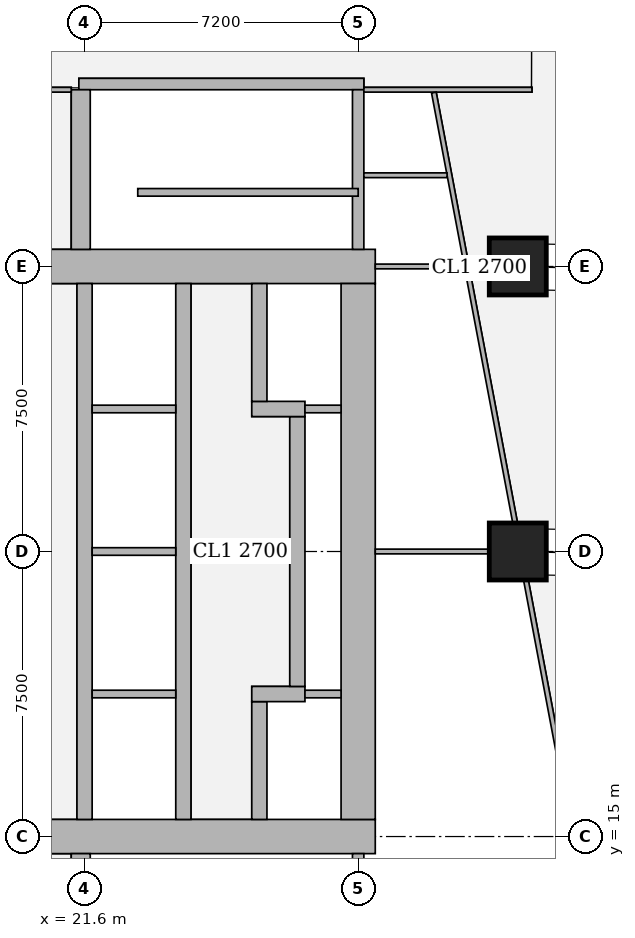
"""IFC4 building model, lengths in metres.
Left out: names, types, materials, properties, quantities, classifications, styles, units other than length and angle.
Written with IfcOpenShell. Run it as: python <this file> out.ifc"""

import sys

from ifc_helpers import new_model, si_unit, direction, frame, frame_2d, origin, origin_2d, place, context, subcontext, project, spatial, rectangle, extrude, element, fill, save


model = new_model("IFC4")
c1 = context("Model", 3, precision=1e-05, world=origin(), true_north=direction((0.0, 1.0)))
c2 = subcontext(c1, "Body", "Model", "MODEL_VIEW")
j1 = project(units=[si_unit("LENGTHUNIT", "METRE"), si_unit("PLANEANGLEUNIT", "RADIAN")], contexts=[c1])
p1 = place(None, origin())
s1 = spatial("IfcSite", under=j1, at=p1, CompositionType="ELEMENT")
p2 = place(p1, origin())
s2 = spatial("IfcBuilding", under=s1, at=p2, CompositionType="ELEMENT")
p3 = place(p2, frame((0.0, 0.0, 180.8)))
s3 = spatial("IfcBuildingStorey", under=s2, at=p3, CompositionType="ELEMENT", Elevation=180.8)
for number, where, z_axis, x_axis in (
    (1, (33.0, 22.5, 0.0), (0.0, 0.0, 1.0), (1.0, 0.0, 0.0)),
    (2, (33.0, 30.0, 0.0), (0.0, 0.0, 1.0), (1.0, 0.0, 0.0)),
):
    element("IfcColumn", number, at=place(p3, frame(where, z_axis=z_axis, x_axis=x_axis)), inside=s3, PredefinedType="COLUMN", context=c2, shape_type="SweptSolid", body=[
        extrude(rectangle(XDim=1.5, YDim=1.5, at=origin_2d()), origin(), (0.0, 0.0, 1.0), 3.75),
    ])
p4 = place(p3, frame((13.95, 15.0, 0.0), z_axis=(0.0, 0.0, 1.0), x_axis=(1.0, 0.0, 0.0)))
e3 = element("IfcWall", 3, at=p4, inside=s3, PredefinedType="SHEAR", context=c2, shape_type="SweptSolid", body=[
    extrude(rectangle(XDim=15.3, YDim=0.9, at=frame_2d((7.65, 0.0))), origin(), (0.0, 0.0, 1.0), 3.75),
])
p5 = place(p4, frame((4.45, 0.0, 0.0)))
e4 = element("IfcOpeningElement", 4, at=p5, cuts=e3, PredefinedType="OPENING", context=c2, shape_type="SweptSolid", body=[
    extrude(rectangle(XDim=1.8, YDim=2.1, at=frame_2d((0.9, 1.05))), frame((0.0, 0.46, 0.0), z_axis=(0.0, -1.0, 0.0), x_axis=(1.0, 0.0, 0.0)), (0.0, 0.0, 1.0), 0.92),
])
p6 = place(p4, frame((10.7, 0.0, 0.0)))
e5 = element("IfcOpeningElement", 5, at=p6, cuts=e3, PredefinedType="OPENING", context=c2, shape_type="SweptSolid", body=[
    extrude(rectangle(XDim=1.1, YDim=2.1, at=frame_2d((0.55, 1.05))), frame((0.0, 0.46, 0.0), z_axis=(0.0, -1.0, 0.0), x_axis=(1.0, 0.0, 0.0)), (0.0, 0.0, 1.0), 0.92),
])
p7 = place(p3, frame((13.95, 30.0, 0.0), z_axis=(0.0, 0.0, 1.0), x_axis=(1.0, 0.0, 0.0)))
e6 = element("IfcWall", 6, at=p7, inside=s3, PredefinedType="SHEAR", context=c2, shape_type="SweptSolid", body=[
    extrude(rectangle(XDim=15.3, YDim=0.9, at=frame_2d((7.65, 0.0))), origin(), (0.0, 0.0, 1.0), 3.75),
])
p8 = place(p7, frame((4.45, 0.0, 0.0)))
e7 = element("IfcOpeningElement", 7, at=p8, cuts=e6, PredefinedType="OPENING", context=c2, shape_type="SweptSolid", body=[
    extrude(rectangle(XDim=1.8, YDim=2.1, at=frame_2d((0.9, 1.05))), frame((0.0, 0.46, 0.0), z_axis=(0.0, -1.0, 0.0), x_axis=(1.0, 0.0, 0.0)), (0.0, 0.0, 1.0), 0.92),
])
p9 = place(p7, frame((10.7, 0.0, 0.0)))
e8 = element("IfcOpeningElement", 8, at=p9, cuts=e6, PredefinedType="OPENING", context=c2, shape_type="SweptSolid", body=[
    extrude(rectangle(XDim=1.1, YDim=2.1, at=frame_2d((0.55, 1.05))), frame((0.0, 0.46, 0.0), z_axis=(0.0, -1.0, 0.0), x_axis=(1.0, 0.0, 0.0)), (0.0, 0.0, 1.0), 0.92),
])
p10 = place(p3, frame((28.8, 15.45, 0.0), z_axis=(0.0, 0.0, 1.0), x_axis=(0.0, 1.0, 0.0)))
e9 = element("IfcWall", 9, at=p10, inside=s3, PredefinedType="SHEAR", context=c2, shape_type="SweptSolid", body=[
    extrude(rectangle(XDim=14.1, YDim=0.9, at=frame_2d((7.05, 0.0))), origin(), (0.0, 0.0, 1.0), 3.75),
])
p11 = place(p3, frame((21.6, 15.45, 0.0), z_axis=(0.0, 0.0, 1.0), x_axis=(0.0, 1.0, 0.0)))
e10 = element("IfcWall", 10, at=p11, inside=s3, PredefinedType="SHEAR", context=c2, shape_type="SweptSolid", body=[
    extrude(rectangle(XDim=14.1, YDim=0.4, at=frame_2d((7.05, 0.0))), origin(), (0.0, 0.0, 1.0), 3.75),
])
p12 = place(p11, frame((0.875, 0.0, 0.0)))
e11 = element("IfcOpeningElement", 11, at=p12, cuts=e10, PredefinedType="OPENING", context=c2, shape_type="SweptSolid", body=[
    extrude(rectangle(XDim=1.1, YDim=2.1, at=frame_2d((0.55, 1.05))), frame((0.0, 0.21, 0.0), z_axis=(0.0, -1.0, 0.0), x_axis=(1.0, 0.0, 0.0)), (0.0, 0.0, 1.0), 0.42),
])
p13 = place(p11, frame((4.625, 0.0, 0.0)))
e12 = element("IfcOpeningElement", 12, at=p13, cuts=e10, PredefinedType="OPENING", context=c2, shape_type="SweptSolid", body=[
    extrude(rectangle(XDim=1.1, YDim=2.1, at=frame_2d((0.55, 1.05))), frame((0.0, 0.21, 0.0), z_axis=(0.0, -1.0, 0.0), x_axis=(1.0, 0.0, 0.0)), (0.0, 0.0, 1.0), 0.42),
])
p14 = place(p11, frame((8.375, 0.0, 0.0)))
e13 = element("IfcOpeningElement", 13, at=p14, cuts=e10, PredefinedType="OPENING", context=c2, shape_type="SweptSolid", body=[
    extrude(rectangle(XDim=1.1, YDim=2.1, at=frame_2d((0.55, 1.05))), frame((0.0, 0.21, 0.0), z_axis=(0.0, -1.0, 0.0), x_axis=(1.0, 0.0, 0.0)), (0.0, 0.0, 1.0), 0.42),
])
p15 = place(p11, frame((12.125, 0.0, 0.0)))
e14 = element("IfcOpeningElement", 14, at=p15, cuts=e10, PredefinedType="OPENING", context=c2, shape_type="SweptSolid", body=[
    extrude(rectangle(XDim=1.1, YDim=2.1, at=frame_2d((0.55, 1.05))), frame((0.0, 0.21, 0.0), z_axis=(0.0, -1.0, 0.0), x_axis=(1.0, 0.0, 0.0)), (0.0, 0.0, 1.0), 0.42),
])
p16 = place(p3, frame((24.2, 15.45, 0.0), z_axis=(0.0, 0.0, 1.0), x_axis=(0.0, 1.0, 0.0)))
e15 = element("IfcWall", 15, at=p16, inside=s3, PredefinedType="SHEAR", context=c2, shape_type="SweptSolid", body=[
    extrude(rectangle(XDim=14.1, YDim=0.4, at=frame_2d((7.05, 0.0))), origin(), (0.0, 0.0, 1.0), 3.75),
])
p17 = place(p3, frame((26.2, 15.45, 0.0), z_axis=(0.0, 0.0, 1.0), x_axis=(0.0, 1.0, 0.0)))
e16 = element("IfcWall", 16, at=p17, inside=s3, PredefinedType="SHEAR", context=c2, shape_type="SweptSolid", body=[
    extrude(rectangle(XDim=3.1, YDim=0.4, at=frame_2d((1.55, 0.0))), origin(), (0.0, 0.0, 1.0), 3.75),
])
p18 = place(p17, frame((0.825, 0.0, 0.0)))
e17 = element("IfcOpeningElement", 17, at=p18, cuts=e16, PredefinedType="OPENING", context=c2, shape_type="SweptSolid", body=[
    extrude(rectangle(XDim=1.2, YDim=2.1, at=frame_2d((0.6, 1.05))), frame((0.0, 0.21, 0.0), z_axis=(0.0, -1.0, 0.0), x_axis=(1.0, 0.0, 0.0)), (0.0, 0.0, 1.0), 0.42),
])
p19 = place(p3, frame((26.0, 18.75, 0.0), z_axis=(0.0, 0.0, 1.0), x_axis=(1.0, 0.0, 0.0)))
e18 = element("IfcWall", 18, at=p19, inside=s3, PredefinedType="SHEAR", context=c2, shape_type="SweptSolid", body=[
    extrude(rectangle(XDim=1.4, YDim=0.4, at=frame_2d((0.7, 0.0))), origin(), (0.0, 0.0, 1.0), 3.75),
])
p20 = place(p3, frame((27.2, 18.95, 0.0), z_axis=(0.0, 0.0, 1.0), x_axis=(0.0, 1.0, 0.0)))
e19 = element("IfcWall", 19, at=p20, inside=s3, PredefinedType="SHEAR", context=c2, shape_type="SweptSolid", body=[
    extrude(rectangle(XDim=7.1, YDim=0.4, at=frame_2d((3.55, 0.0))), origin(), (0.0, 0.0, 1.0), 3.75),
])
p21 = place(p3, frame((26.0, 26.25, 0.0), z_axis=(0.0, 0.0, 1.0), x_axis=(1.0, 0.0, 0.0)))
e20 = element("IfcWall", 20, at=p21, inside=s3, PredefinedType="SHEAR", context=c2, shape_type="SweptSolid", body=[
    extrude(rectangle(XDim=1.4, YDim=0.4, at=frame_2d((0.7, 0.0))), origin(), (0.0, 0.0, 1.0), 3.75),
])
p22 = place(p3, frame((26.2, 26.45, 0.0), z_axis=(0.0, 0.0, 1.0), x_axis=(0.0, 1.0, 0.0)))
e21 = element("IfcWall", 21, at=p22, inside=s3, PredefinedType="SHEAR", context=c2, shape_type="SweptSolid", body=[
    extrude(rectangle(XDim=3.1, YDim=0.4, at=frame_2d((1.55, 0.0))), origin(), (0.0, 0.0, 1.0), 3.75),
])
p23 = place(p22, frame((1.075, 0.0, 0.0)))
e22 = element("IfcOpeningElement", 22, at=p23, cuts=e21, PredefinedType="OPENING", context=c2, shape_type="SweptSolid", body=[
    extrude(rectangle(XDim=1.2, YDim=2.1, at=frame_2d((0.6, 1.05))), frame((0.0, 0.21, 0.0), z_axis=(0.0, -1.0, 0.0), x_axis=(1.0, 0.0, 0.0)), (0.0, 0.0, 1.0), 0.42),
])
p24 = place(p3, frame((21.5, 10.35, 0.0), z_axis=(0.0, 0.0, 1.0), x_axis=(0.0, 1.0, 0.0)))
e23 = element("IfcWall", 23, at=p24, inside=s3, PredefinedType="SHEAR", context=c2, shape_type="SweptSolid", body=[
    extrude(rectangle(XDim=4.2, YDim=0.5, at=frame_2d((2.1, 0.0))), origin(), (0.0, 0.0, 1.0), 3.75),
])
p25 = place(p3, frame((28.8, 10.35, 0.0), z_axis=(0.0, 0.0, 1.0), x_axis=(0.0, 1.0, 0.0)))
e24 = element("IfcWall", 24, at=p25, inside=s3, PredefinedType="SHEAR", context=c2, shape_type="SweptSolid", body=[
    extrude(rectangle(XDim=4.2, YDim=0.3, at=frame_2d((2.1, 0.0))), origin(), (0.0, 0.0, 1.0), 3.75),
])
p26 = place(p3, frame((21.45, 34.8, 0.0), z_axis=(0.0, 0.0, 1.0), x_axis=(1.0, 0.0, 0.0)))
e25 = element("IfcWall", 25, at=p26, inside=s3, PredefinedType="SHEAR", context=c2, shape_type="SweptSolid", body=[
    extrude(rectangle(XDim=7.5, YDim=0.3, at=frame_2d((3.75, 0.0))), origin(), (0.0, 0.0, 1.0), 3.75),
])
p27 = place(p26, frame((0.5, 0.0, 0.0)))
e26 = element("IfcOpeningElement", 26, at=p27, cuts=e25, PredefinedType="OPENING", context=c2, shape_type="SweptSolid", body=[
    extrude(rectangle(XDim=1.1, YDim=2.1, at=frame_2d((0.55, 1.05))), frame((0.0, 0.16, 0.0), z_axis=(0.0, -1.0, 0.0), x_axis=(1.0, 0.0, 0.0)), (0.0, 0.0, 1.0), 0.32),
])
p28 = place(p3, frame((21.5, 30.45, 0.0), z_axis=(0.0, 0.0, 1.0), x_axis=(0.0, 1.0, 0.0)))
e27 = element("IfcWall", 27, at=p28, inside=s3, PredefinedType="SHEAR", context=c2, shape_type="SweptSolid", body=[
    extrude(rectangle(XDim=4.2, YDim=0.5, at=frame_2d((2.1, 0.0))), origin(), (0.0, 0.0, 1.0), 3.75),
])
p29 = place(p3, frame((28.8, 30.45, 0.0), z_axis=(0.0, 0.0, 1.0), x_axis=(0.0, 1.0, 0.0)))
e28 = element("IfcWall", 28, at=p29, inside=s3, PredefinedType="SHEAR", context=c2, shape_type="SweptSolid", body=[
    extrude(rectangle(XDim=4.2, YDim=0.3, at=frame_2d((2.1, 0.0))), origin(), (0.0, 0.0, 1.0), 3.75),
])
p30 = place(p3, frame((33.623, 43.022, 0.0), z_axis=(0.0, 0.0, 1.0), x_axis=(0.185596841028, -0.98262597798, 0.0)))
e29 = element("IfcWall", 29, at=p30, inside=s3, PredefinedType="SOLIDWALL", context=c2, shape_type="SweptSolid", body=[
    extrude(rectangle(XDim=41.66, YDim=0.15, at=frame_2d((20.83, 0.0))), origin(), (0.0, 0.0, 1.0), 2.5),
])
p31 = place(p30, frame((8.034, 0.0, 0.0)))
e30 = element("IfcOpeningElement", 30, at=p31, cuts=e29, PredefinedType="OPENING", context=c2, shape_type="SweptSolid", body=[
    extrude(rectangle(XDim=1.0, YDim=2.1, at=frame_2d((0.5, 1.05))), frame((0.0, 0.085, 0.0), z_axis=(0.0, -1.0, 0.0), x_axis=(1.0, 0.0, 0.0)), (0.0, 0.0, 1.0), 0.17),
])
p32 = place(p30, frame((12.611, 0.0, 0.0)))
e31 = element("IfcOpeningElement", 31, at=p32, cuts=e29, PredefinedType="OPENING", context=c2, shape_type="SweptSolid", body=[
    extrude(rectangle(XDim=1.0, YDim=2.1, at=frame_2d((0.5, 1.05))), frame((0.0, 0.085, 0.0), z_axis=(0.0, -1.0, 0.0), x_axis=(1.0, 0.0, 0.0)), (0.0, 0.0, 1.0), 0.17),
])
p33 = place(p30, frame((20.242, 0.0, 0.0)))
e32 = element("IfcOpeningElement", 32, at=p33, cuts=e29, PredefinedType="OPENING", context=c2, shape_type="SweptSolid", body=[
    extrude(rectangle(XDim=1.0, YDim=2.1, at=frame_2d((0.5, 1.05))), frame((0.0, 0.085, 0.0), z_axis=(0.0, -1.0, 0.0), x_axis=(1.0, 0.0, 0.0)), (0.0, 0.0, 1.0), 0.17),
])
p34 = place(p30, frame((31.206, 0.0, 0.0)))
e33 = element("IfcOpeningElement", 33, at=p34, cuts=e29, PredefinedType="OPENING", context=c2, shape_type="SweptSolid", body=[
    extrude(rectangle(XDim=1.0, YDim=2.1, at=frame_2d((0.5, 1.05))), frame((0.0, 0.085, 0.0), z_axis=(0.0, -1.0, 0.0), x_axis=(1.0, 0.0, 0.0)), (0.0, 0.0, 1.0), 0.17),
])
p35 = place(p3, frame((10.413, 34.65, 0.0), z_axis=(0.0, 0.0, 1.0), x_axis=(1.0, 0.0, 0.0)))
e34 = element("IfcWall", 34, at=p35, inside=s3, PredefinedType="PARTITIONING", context=c2, shape_type="SweptSolid", body=[
    extrude(rectangle(XDim=10.837, YDim=0.125, at=frame_2d((5.418, 0.0))), origin(), (0.0, 0.0, 1.0), 3.5),
])
p36 = place(p35, frame((7.487, 0.0, 0.0)))
e35 = element("IfcOpeningElement", 35, at=p36, cuts=e34, PredefinedType="OPENING", context=c2, shape_type="SweptSolid", body=[
    extrude(rectangle(XDim=1.8, YDim=2.1, at=frame_2d((0.9, 1.05))), frame((0.0, 0.073, 0.0), z_axis=(0.0, -1.0, 0.0), x_axis=(1.0, 0.0, 0.0)), (0.0, 0.0, 1.0), 0.145),
])
p37 = place(p3, frame((28.95, 34.65, 0.0), z_axis=(0.0, 0.0, 1.0), x_axis=(1.0, 0.0, 0.0)))
e36 = element("IfcWall", 36, at=p37, inside=s3, PredefinedType="PARTITIONING", context=c2, shape_type="SweptSolid", body=[
    extrude(rectangle(XDim=4.423, YDim=0.125, at=frame_2d((2.211, 0.0))), origin(), (0.0, 0.0, 1.0), 3.5),
])
p38 = place(p3, frame((35.354, 10.424, 0.0), z_axis=(0.0, 0.0, 1.0), x_axis=(-0.185612234763, 0.982623070311, 0.0)))
e37 = element("IfcWall", 37, at=p38, inside=s3, PredefinedType="PARTITIONING", context=c2, shape_type="SweptSolid", body=[
    extrude(rectangle(XDim=11.513, YDim=0.125, at=frame_2d((5.756, 0.0))), origin(), (0.0, 0.0, 1.0), 3.5),
])
p39 = place(p38, frame((0.697, 0.0, 0.0)))
e38 = element("IfcOpeningElement", 38, at=p39, cuts=e37, PredefinedType="OPENING", context=c2, shape_type="SweptSolid", body=[
    extrude(rectangle(XDim=1.0, YDim=2.1, at=frame_2d((0.5, 1.05))), frame((0.0, 0.073, 0.0), z_axis=(0.0, -1.0, 0.0), x_axis=(1.0, 0.0, 0.0)), (0.0, 0.0, 1.0), 0.145),
])
p40 = place(p3, frame((32.929, 23.263, 0.0), z_axis=(0.0, 0.0, 1.0), x_axis=(-0.185612234763, 0.982623070311, 0.0)))
e39 = element("IfcWall", 39, at=p40, inside=s3, PredefinedType="PARTITIONING", context=c2, shape_type="SweptSolid", body=[
    extrude(rectangle(XDim=11.513, YDim=0.125, at=frame_2d((5.756, 0.0))), origin(), (0.0, 0.0, 1.0), 3.5),
])
p41 = place(p40, frame((0.15, 0.0, 0.0)))
e40 = element("IfcOpeningElement", 40, at=p41, cuts=e39, PredefinedType="OPENING", context=c2, shape_type="SweptSolid", body=[
    extrude(rectangle(XDim=1.0, YDim=2.1, at=frame_2d((0.5, 1.05))), frame((0.0, 0.073, 0.0), z_axis=(0.0, -1.0, 0.0), x_axis=(1.0, 0.0, 0.0)), (0.0, 0.0, 1.0), 0.145),
])
p42 = place(p40, frame((7.679, 0.0, 0.0)))
e41 = element("IfcOpeningElement", 41, at=p42, cuts=e39, PredefinedType="OPENING", context=c2, shape_type="SweptSolid", body=[
    extrude(rectangle(XDim=1.0, YDim=2.1, at=frame_2d((0.5, 1.05))), frame((0.0, 0.073, 0.0), z_axis=(0.0, -1.0, 0.0), x_axis=(1.0, 0.0, 0.0)), (0.0, 0.0, 1.0), 0.145),
])
p43 = place(p40, frame((10.122, 0.0, 0.0)))
e42 = element("IfcOpeningElement", 42, at=p43, cuts=e39, PredefinedType="OPENING", context=c2, shape_type="SweptSolid", body=[
    extrude(rectangle(XDim=1.0, YDim=2.1, at=frame_2d((0.5, 1.05))), frame((0.0, 0.073, 0.0), z_axis=(0.0, -1.0, 0.0), x_axis=(1.0, 0.0, 0.0)), (0.0, 0.0, 1.0), 0.145),
])
p44 = place(p3, frame((29.25, 22.5, 0.0), z_axis=(0.0, 0.0, 1.0), x_axis=(1.0, 0.0, 0.0)))
e43 = element("IfcWall", 43, at=p44, inside=s3, PredefinedType="PARTITIONING", context=c2, shape_type="SweptSolid", body=[
    extrude(rectangle(XDim=2.999, YDim=0.125, at=frame_2d((1.5, 0.0))), origin(), (0.0, 0.0, 1.0), 3.5),
])
p45 = place(p3, frame((29.25, 30.0, 0.0), z_axis=(0.0, 0.0, 1.0), x_axis=(1.0, 0.0, 0.0)))
e44 = element("IfcWall", 44, at=p45, inside=s3, PredefinedType="PARTITIONING", context=c2, shape_type="SweptSolid", body=[
    extrude(rectangle(XDim=2.342, YDim=0.125, at=frame_2d((1.171, 0.0))), origin(), (0.0, 0.0, 1.0), 3.5),
])
p46 = place(p3, frame((28.95, 32.4, 0.0), z_axis=(0.0, 0.0, 1.0), x_axis=(1.0, 0.0, 0.0)))
e45 = element("IfcWall", 45, at=p46, inside=s3, PredefinedType="PARTITIONING", context=c2, shape_type="SweptSolid", body=[
    extrude(rectangle(XDim=2.189, YDim=0.125, at=frame_2d((1.094, 0.0))), origin(), (0.0, 0.0, 1.0), 3.5),
])
p47 = place(p3, frame((23.0, 31.95, 0.0), z_axis=(0.0, 0.0, 1.0), x_axis=(1.0, 0.0, 0.0)))
e46 = element("IfcWall", 46, at=p47, inside=s3, PredefinedType="SHEAR", context=c2, shape_type="SweptSolid", body=[
    extrude(rectangle(XDim=5.8, YDim=0.2, at=frame_2d((2.9, 0.0))), origin(), (0.0, 0.0, 1.0), 3.75),
])
for number, where, z_axis, x_axis in (
    (47, (21.8, 18.75, 0.0), (0.0, 0.0, 1.0), (1.0, 0.0, 0.0)),
    (48, (21.8, 22.5, 0.0), (0.0, 0.0, 1.0), (1.0, 0.0, 0.0)),
    (49, (21.8, 26.25, 0.0), (0.0, 0.0, 1.0), (1.0, 0.0, 0.0)),
):
    element("IfcWall", number, at=place(p3, frame(where, z_axis=z_axis, x_axis=x_axis)), inside=s3, PredefinedType="SOLIDWALL", context=c2, shape_type="SweptSolid", body=[
        extrude(rectangle(XDim=2.2, YDim=0.2, at=frame_2d((1.1, 0.0))), origin(), (0.0, 0.0, 1.0), 3.5),
    ])
for number, where, z_axis, x_axis in (
    (50, (27.4, 18.75, 0.0), (0.0, 0.0, 1.0), (1.0, 0.0, 0.0)),
    (51, (27.4, 26.25, 0.0), (0.0, 0.0, 1.0), (1.0, 0.0, 0.0)),
):
    element("IfcWall", number, at=place(p3, frame(where, z_axis=z_axis, x_axis=x_axis)), inside=s3, PredefinedType="SOLIDWALL", context=c2, shape_type="SweptSolid", body=[
        extrude(rectangle(XDim=0.95, YDim=0.2, at=frame_2d((0.475, 0.0))), origin(), (0.0, 0.0, 1.0), 3.5),
    ])
p48 = place(p41, origin())
e52 = element("IfcDoor", 52, at=p48, inside=s3, OperationType="SINGLE_SWING_LEFT", PredefinedType="DOOR", context=c2, shape_type="SweptSolid", body=[
    extrude(rectangle(XDim=1.0, YDim=2.1, at=frame_2d((0.5, 1.05))), frame((0.0, 0.025, 0.0), z_axis=(0.0, -1.0, 0.0), x_axis=(1.0, 0.0, 0.0)), (0.0, 0.0, 1.0), 0.05),
])
fill(e40, e52)
p49 = place(p42, origin())
e53 = element("IfcDoor", 53, at=p49, inside=s3, OperationType="SINGLE_SWING_RIGHT", PredefinedType="DOOR", context=c2, shape_type="SweptSolid", body=[
    extrude(rectangle(XDim=1.0, YDim=2.1, at=frame_2d((0.5, 1.05))), frame((0.0, 0.025, 0.0), z_axis=(0.0, -1.0, 0.0), x_axis=(1.0, 0.0, 0.0)), (0.0, 0.0, 1.0), 0.05),
])
fill(e41, e53)
p50 = place(p43, origin())
e54 = element("IfcDoor", 54, at=p50, inside=s3, OperationType="SINGLE_SWING_RIGHT", PredefinedType="DOOR", context=c2, shape_type="SweptSolid", body=[
    extrude(rectangle(XDim=1.0, YDim=2.1, at=frame_2d((0.5, 1.05))), frame((0.0, 0.025, 0.0), z_axis=(0.0, -1.0, 0.0), x_axis=(1.0, 0.0, 0.0)), (0.0, 0.0, 1.0), 0.05),
])
fill(e42, e54)
p51 = place(p6, origin())
e55 = element("IfcDoor", 55, at=p51, inside=s3, OperationType="SINGLE_SWING_RIGHT", PredefinedType="DOOR", context=c2, shape_type="SweptSolid", body=[
    extrude(rectangle(XDim=1.1, YDim=2.1, at=frame_2d((0.55, 1.05))), frame((0.0, 0.025, 0.0), z_axis=(0.0, -1.0, 0.0), x_axis=(1.0, 0.0, 0.0)), (0.0, 0.0, 1.0), 0.05),
])
fill(e5, e55)
p52 = place(p9, origin())
e56 = element("IfcDoor", 56, at=p52, inside=s3, OperationType="SINGLE_SWING_RIGHT", PredefinedType="DOOR", context=c2, shape_type="SweptSolid", body=[
    extrude(rectangle(XDim=1.1, YDim=2.1, at=frame_2d((0.55, 1.05))), frame((0.0, 0.025, 0.0), z_axis=(0.0, -1.0, 0.0), x_axis=(1.0, 0.0, 0.0)), (0.0, 0.0, 1.0), 0.05),
])
fill(e8, e56)
p53 = place(p18, origin())
e57 = element("IfcDoor", 57, at=p53, inside=s3, OperationType="DOUBLE_DOOR_SLIDING", PredefinedType="DOOR", context=c2, shape_type="SweptSolid", body=[
    extrude(rectangle(XDim=1.2, YDim=2.1, at=frame_2d((0.6, 1.05))), frame((0.0, 0.025, 0.0), z_axis=(0.0, -1.0, 0.0), x_axis=(1.0, 0.0, 0.0)), (0.0, 0.0, 1.0), 0.05),
])
fill(e17, e57)
p54 = place(p23, origin())
e58 = element("IfcDoor", 58, at=p54, inside=s3, OperationType="DOUBLE_DOOR_SLIDING", PredefinedType="DOOR", context=c2, shape_type="SweptSolid", body=[
    extrude(rectangle(XDim=1.2, YDim=2.1, at=frame_2d((0.6, 1.05))), frame((0.0, 0.025, 0.0), z_axis=(0.0, -1.0, 0.0), x_axis=(1.0, 0.0, 0.0)), (0.0, 0.0, 1.0), 0.05),
])
fill(e22, e58)
p55 = place(p12, origin())
e59 = element("IfcDoor", 59, at=p55, inside=s3, OperationType="DOUBLE_DOOR_SLIDING", PredefinedType="DOOR", context=c2, shape_type="SweptSolid", body=[
    extrude(rectangle(XDim=1.1, YDim=2.1, at=frame_2d((0.55, 1.05))), frame((0.0, 0.025, 0.0), z_axis=(0.0, -1.0, 0.0), x_axis=(1.0, 0.0, 0.0)), (0.0, 0.0, 1.0), 0.05),
])
fill(e11, e59)
p56 = place(p13, origin())
e60 = element("IfcDoor", 60, at=p56, inside=s3, OperationType="DOUBLE_DOOR_SLIDING", PredefinedType="DOOR", context=c2, shape_type="SweptSolid", body=[
    extrude(rectangle(XDim=1.1, YDim=2.1, at=frame_2d((0.55, 1.05))), frame((0.0, 0.025, 0.0), z_axis=(0.0, -1.0, 0.0), x_axis=(1.0, 0.0, 0.0)), (0.0, 0.0, 1.0), 0.05),
])
fill(e12, e60)
p57 = place(p14, origin())
e61 = element("IfcDoor", 61, at=p57, inside=s3, OperationType="DOUBLE_DOOR_SLIDING", PredefinedType="DOOR", context=c2, shape_type="SweptSolid", body=[
    extrude(rectangle(XDim=1.1, YDim=2.1, at=frame_2d((0.55, 1.05))), frame((0.0, 0.025, 0.0), z_axis=(0.0, -1.0, 0.0), x_axis=(1.0, 0.0, 0.0)), (0.0, 0.0, 1.0), 0.05),
])
fill(e13, e61)
p58 = place(p15, origin())
e62 = element("IfcDoor", 62, at=p58, inside=s3, OperationType="DOUBLE_DOOR_SLIDING", PredefinedType="DOOR", context=c2, shape_type="SweptSolid", body=[
    extrude(rectangle(XDim=1.1, YDim=2.1, at=frame_2d((0.55, 1.05))), frame((0.0, 0.025, 0.0), z_axis=(0.0, -1.0, 0.0), x_axis=(1.0, 0.0, 0.0)), (0.0, 0.0, 1.0), 0.05),
])
fill(e14, e62)
p59 = place(p27, origin())
e63 = element("IfcDoor", 63, at=p59, inside=s3, OperationType="SINGLE_SWING_RIGHT", PredefinedType="DOOR", context=c2, shape_type="SweptSolid", body=[
    extrude(rectangle(XDim=1.1, YDim=2.1, at=frame_2d((0.55, 1.05))), frame((0.0, 0.025, 0.0), z_axis=(0.0, -1.0, 0.0), x_axis=(1.0, 0.0, 0.0)), (0.0, 0.0, 1.0), 0.05),
])
fill(e26, e63)
save(model, sys.argv[1])
